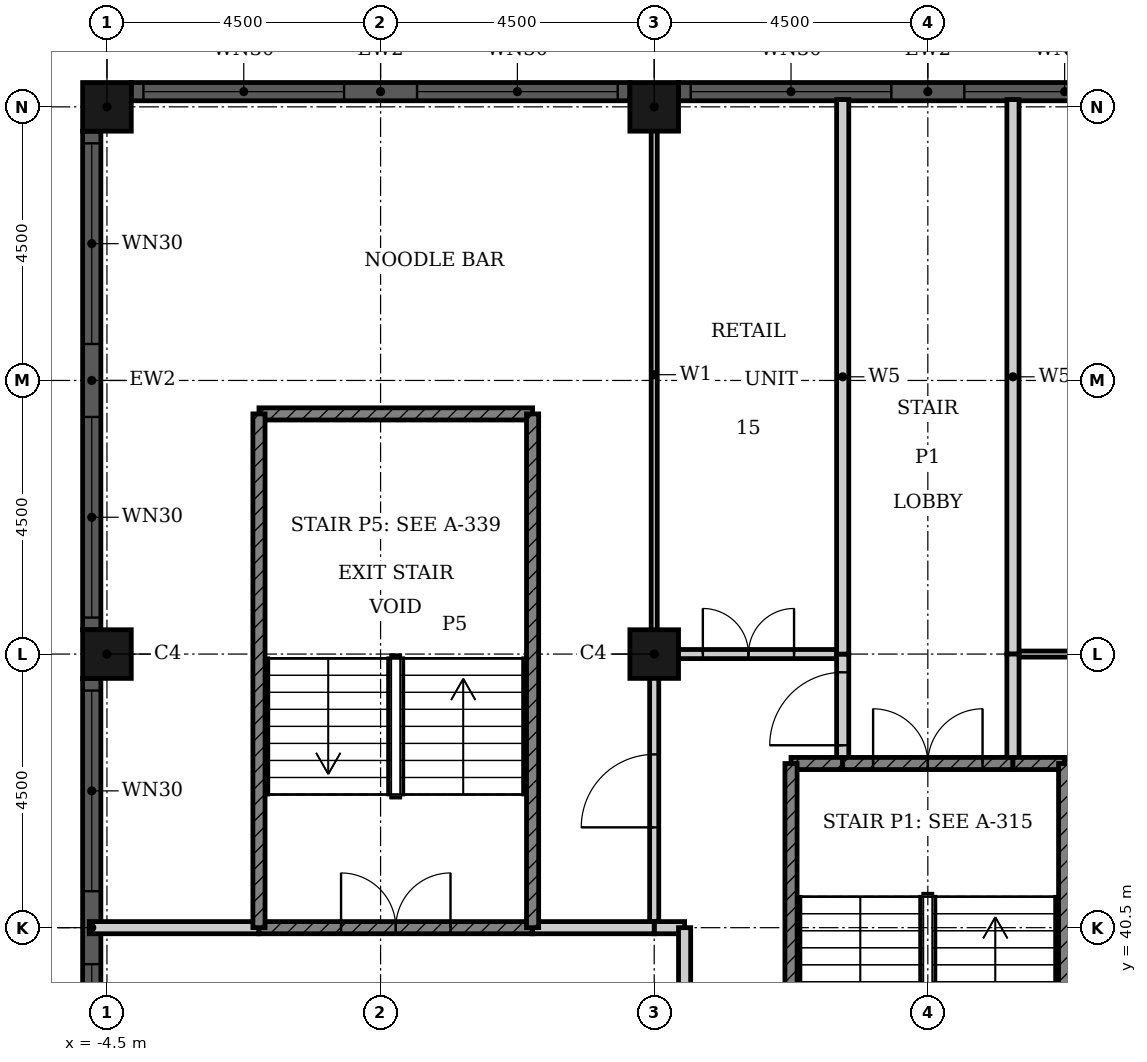
"""IFC4 building model, lengths in metres.
Left out: names, types, materials, properties, quantities, classifications, styles, units other than length and angle.
Written with IfcOpenShell. Run it as: python <this file> out.ifc"""

import sys

from ifc_helpers import new_model, si_unit, direction, frame, frame_2d, origin, origin_2d, place, context, subcontext, project, spatial, rectangle, hollow_rectangle, extrude, element, fill, save


model = new_model("IFC4")
c1 = context("Model", 3, precision=1e-05, world=origin(), true_north=direction((0.0, 1.0)))
c2 = subcontext(c1, "Body", "Model", "MODEL_VIEW")
j1 = project(units=[si_unit("LENGTHUNIT", "METRE"), si_unit("PLANEANGLEUNIT", "RADIAN")], contexts=[c1])
p1 = place(None, origin())
s1 = spatial("IfcSite", under=j1, at=p1, CompositionType="ELEMENT")
p2 = place(p1, origin())
s2 = spatial("IfcBuilding", under=s1, at=p2, CompositionType="ELEMENT")
p3 = place(p2, frame((0.0, 0.0, 12.0)))
s3 = spatial("IfcBuildingStorey", under=s2, at=p3, CompositionType="ELEMENT", Elevation=12.0)
for number, where, z_axis, x_axis in (
    (1, (-4.5, 45.0, 0.0), (0.0, 0.0, 1.0), (1.0, 0.0, 0.0)),
    (2, (-4.5, 54.0, 0.0), (0.0, 0.0, 1.0), (1.0, 0.0, 0.0)),
    (3, (4.5, 54.0, 0.0), (0.0, 0.0, 1.0), (1.0, 0.0, 0.0)),
    (4, (4.5, 45.0, 0.0), (0.0, 0.0, 1.0), (1.0, 0.0, 0.0)),
):
    element("IfcColumn", number, at=place(p3, frame(where, z_axis=z_axis, x_axis=x_axis)), inside=s3, PredefinedType="COLUMN", context=c2, shape_type="SweptSolid", body=[
        extrude(hollow_rectangle(XDim=0.8, YDim=0.8, WallThickness=0.025, at=origin_2d()), origin(), (0.0, 0.0, 1.0), 5.4),
    ])
p4 = place(p3, frame((13.1, 54.25, 0.0), z_axis=(0.0, 0.0, 1.0), x_axis=(-1.0, 0.0, 0.0)))
e5 = element("IfcWall", 5, at=p4, inside=s3, PredefinedType="SOLIDWALL", context=c2, shape_type="SweptSolid", body=[
    extrude(rectangle(XDim=8.2, YDim=0.3, at=frame_2d((4.1, 0.0))), origin(), (0.0, 0.0, 1.0), 5.4),
])
p5 = place(p4, frame((0.2, 0.0, 0.9)))
e6 = element("IfcOpeningElement", 6, at=p5, cuts=e5, PredefinedType="OPENING", context=c2, shape_type="SweptSolid", body=[
    extrude(rectangle(XDim=3.3, YDim=3.5, at=frame_2d((1.65, 1.75))), frame((0.0, 0.16, 0.0), z_axis=(0.0, -1.0, 0.0), x_axis=(1.0, 0.0, 0.0)), (0.0, 0.0, 1.0), 0.32),
])
p6 = place(p4, frame((4.7, 0.0, 0.9)))
e7 = element("IfcOpeningElement", 7, at=p6, cuts=e5, PredefinedType="OPENING", context=c2, shape_type="SweptSolid", body=[
    extrude(rectangle(XDim=3.3, YDim=3.5, at=frame_2d((1.65, 1.75))), frame((0.0, 0.16, 0.0), z_axis=(0.0, -1.0, 0.0), x_axis=(1.0, 0.0, 0.0)), (0.0, 0.0, 1.0), 0.32),
])
p7 = place(p3, frame((4.1, 54.25, 0.0), z_axis=(0.0, 0.0, 1.0), x_axis=(-1.0, 0.0, 0.0)))
e8 = element("IfcWall", 8, at=p7, inside=s3, PredefinedType="SOLIDWALL", context=c2, shape_type="SweptSolid", body=[
    extrude(rectangle(XDim=8.2, YDim=0.3, at=frame_2d((4.1, 0.0))), origin(), (0.0, 0.0, 1.0), 5.4),
])
p8 = place(p7, frame((0.2, 0.0, 0.9)))
e9 = element("IfcOpeningElement", 9, at=p8, cuts=e8, PredefinedType="OPENING", context=c2, shape_type="SweptSolid", body=[
    extrude(rectangle(XDim=3.3, YDim=3.5, at=frame_2d((1.65, 1.75))), frame((0.0, 0.16, 0.0), z_axis=(0.0, -1.0, 0.0), x_axis=(1.0, 0.0, 0.0)), (0.0, 0.0, 1.0), 0.32),
])
p9 = place(p7, frame((4.7, 0.0, 0.9)))
e10 = element("IfcOpeningElement", 10, at=p9, cuts=e8, PredefinedType="OPENING", context=c2, shape_type="SweptSolid", body=[
    extrude(rectangle(XDim=3.3, YDim=3.5, at=frame_2d((1.65, 1.75))), frame((0.0, 0.16, 0.0), z_axis=(0.0, -1.0, 0.0), x_axis=(1.0, 0.0, 0.0)), (0.0, 0.0, 1.0), 0.32),
])
p10 = place(p3, frame((-4.75, 53.6, 0.0), z_axis=(0.0, 0.0, 1.0), x_axis=(0.0, -1.0, 0.0)))
e11 = element("IfcWall", 11, at=p10, inside=s3, PredefinedType="SOLIDWALL", context=c2, shape_type="SweptSolid", body=[
    extrude(rectangle(XDim=8.2, YDim=0.3, at=frame_2d((4.1, 0.0))), origin(), (0.0, 0.0, 1.0), 5.4),
])
p11 = place(p10, frame((0.2, 0.0, 0.9)))
e12 = element("IfcOpeningElement", 12, at=p11, cuts=e11, PredefinedType="OPENING", context=c2, shape_type="SweptSolid", body=[
    extrude(rectangle(XDim=3.3, YDim=3.5, at=frame_2d((1.65, 1.75))), frame((0.0, 0.16, 0.0), z_axis=(0.0, -1.0, 0.0), x_axis=(1.0, 0.0, 0.0)), (0.0, 0.0, 1.0), 0.32),
])
p12 = place(p10, frame((4.7, 0.0, 0.9)))
e13 = element("IfcOpeningElement", 13, at=p12, cuts=e11, PredefinedType="OPENING", context=c2, shape_type="SweptSolid", body=[
    extrude(rectangle(XDim=3.3, YDim=3.5, at=frame_2d((1.65, 1.75))), frame((0.0, 0.16, 0.0), z_axis=(0.0, -1.0, 0.0), x_axis=(1.0, 0.0, 0.0)), (0.0, 0.0, 1.0), 0.32),
])
p13 = place(p3, frame((-4.75, 44.6, 0.0), z_axis=(0.0, 0.0, 1.0), x_axis=(0.0, -1.0, 0.0)))
e14 = element("IfcWall", 14, at=p13, inside=s3, PredefinedType="SOLIDWALL", context=c2, shape_type="SweptSolid", body=[
    extrude(rectangle(XDim=8.2, YDim=0.3, at=frame_2d((4.1, 0.0))), origin(), (0.0, 0.0, 1.0), 5.4),
])
p14 = place(p13, frame((0.2, 0.0, 0.9)))
e15 = element("IfcOpeningElement", 15, at=p14, cuts=e14, PredefinedType="OPENING", context=c2, shape_type="SweptSolid", body=[
    extrude(rectangle(XDim=3.3, YDim=3.5, at=frame_2d((1.65, 1.75))), frame((0.0, 0.16, 0.0), z_axis=(0.0, -1.0, 0.0), x_axis=(1.0, 0.0, 0.0)), (0.0, 0.0, 1.0), 0.32),
])
p15 = place(p13, frame((4.7, 0.0, 0.9)))
e16 = element("IfcOpeningElement", 16, at=p15, cuts=e14, PredefinedType="OPENING", context=c2, shape_type="SweptSolid", body=[
    extrude(rectangle(XDim=3.3, YDim=3.5, at=frame_2d((1.65, 1.75))), frame((0.0, 0.16, 0.0), z_axis=(0.0, -1.0, 0.0), x_axis=(1.0, 0.0, 0.0)), (0.0, 0.0, 1.0), 0.32),
])
p16 = place(p3, frame((4.5, 45.0, 0.0), z_axis=(0.0, 0.0, 1.0), x_axis=(1.0, 0.0, 0.0)))
e17 = element("IfcWall", 17, at=p16, inside=s3, PredefinedType="PARTITIONING", context=c2, shape_type="SweptSolid", body=[
    extrude(rectangle(XDim=3.1, YDim=0.15, at=frame_2d((1.55, 0.0))), origin(), (0.0, 0.0, 1.0), 5.05),
])
p17 = place(p16, frame((0.8, 0.0, 0.0)))
e18 = element("IfcOpeningElement", 18, at=p17, cuts=e17, PredefinedType="OPENING", context=c2, shape_type="SweptSolid", body=[
    extrude(rectangle(XDim=1.5, YDim=2.4, at=frame_2d((0.75, 1.2))), frame((0.0, 0.085, 0.0), z_axis=(0.0, -1.0, 0.0), x_axis=(1.0, 0.0, 0.0)), (0.0, 0.0, 1.0), 0.17),
])
p18 = place(p3, frame((4.5, 40.5, 0.0), z_axis=(0.0, 0.0, 1.0), x_axis=(0.0, 1.0, 0.0)))
e19 = element("IfcWall", 19, at=p18, inside=s3, PredefinedType="PARTITIONING", context=c2, shape_type="SweptSolid", body=[
    extrude(rectangle(XDim=4.5, YDim=0.15, at=frame_2d((2.25, 0.0))), origin(), (0.0, 0.0, 1.0), 5.05),
])
p19 = place(p18, frame((1.65, 0.0, 0.0)))
e20 = element("IfcOpeningElement", 20, at=p19, cuts=e19, PredefinedType="OPENING", context=c2, shape_type="SweptSolid", body=[
    extrude(rectangle(XDim=1.2, YDim=2.4, at=frame_2d((0.6, 1.2))), frame((0.0, 0.085, 0.0), z_axis=(0.0, -1.0, 0.0), x_axis=(1.0, 0.0, 0.0)), (0.0, 0.0, 1.0), 0.17),
])
p20 = place(p3, frame((10.4, 45.0, 0.0), z_axis=(0.0, 0.0, 1.0), x_axis=(1.0, 0.0, 0.0)))
e21 = element("IfcWall", 21, at=p20, inside=s3, PredefinedType="PARTITIONING", context=c2, shape_type="SweptSolid", body=[
    extrude(rectangle(XDim=4.6, YDim=0.1, at=frame_2d((2.3, 0.0))), origin(), (0.0, 0.0, 1.0), 5.05),
])
p21 = place(p3, frame((4.5, 45.0, 0.0), z_axis=(0.0, 0.0, 1.0), x_axis=(0.0, 1.0, 0.0)))
e22 = element("IfcWall", 22, at=p21, inside=s3, PredefinedType="PARTITIONING", context=c2, shape_type="SweptSolid", body=[
    extrude(rectangle(XDim=9.19, YDim=0.1, at=frame_2d((4.595, 0.0))), origin(), (0.0, 0.0, 1.0), 5.05),
])
p22 = place(p3, frame((4.5, 40.5, 0.0), z_axis=(0.0, 0.0, 1.0), x_axis=(1.0, 0.0, 0.0)))
e23 = element("IfcWall", 23, at=p22, inside=s3, PredefinedType="PARTITIONING", context=c2, shape_type="SweptSolid", body=[
    extrude(rectangle(XDim=0.5, YDim=0.2, at=frame_2d((0.25, 0.0))), origin(), (0.0, 0.0, 1.0), 5.05),
])
p23 = place(p3, frame((-4.79, 40.5, 0.0), z_axis=(0.0, 0.0, 1.0), x_axis=(1.0, 0.0, 0.0)))
e24 = element("IfcWall", 24, at=p23, inside=s3, PredefinedType="PARTITIONING", context=c2, shape_type="SweptSolid", body=[
    extrude(rectangle(XDim=2.79, YDim=0.2, at=frame_2d((1.395, 0.0))), origin(), (0.0, 0.0, 1.0), 5.05),
])
p24 = place(p3, frame((2.5, 40.5, 0.0), z_axis=(0.0, 0.0, 1.0), x_axis=(1.0, 0.0, 0.0)))
e25 = element("IfcWall", 25, at=p24, inside=s3, PredefinedType="PARTITIONING", context=c2, shape_type="SweptSolid", body=[
    extrude(rectangle(XDim=2.0, YDim=0.2, at=frame_2d((1.0, 0.0))), origin(), (0.0, 0.0, 1.0), 5.05),
])
p25 = place(p3, frame((10.4, 45.0, 0.0), z_axis=(0.0, 0.0, 1.0), x_axis=(0.0, 1.0, 0.0)))
e26 = element("IfcWall", 26, at=p25, inside=s3, PredefinedType="PARTITIONING", context=c2, shape_type="SweptSolid", body=[
    extrude(rectangle(XDim=9.12, YDim=0.2, at=frame_2d((4.56, 0.0))), origin(), (0.0, 0.0, 1.0), 5.05),
])
p26 = place(p3, frame((10.4, 43.2, 0.0), z_axis=(0.0, 0.0, 1.0), x_axis=(0.0, 1.0, 0.0)))
e27 = element("IfcWall", 27, at=p26, inside=s3, PredefinedType="PARTITIONING", context=c2, shape_type="SweptSolid", body=[
    extrude(rectangle(XDim=1.8, YDim=0.2, at=frame_2d((0.9, 0.0))), origin(), (0.0, 0.0, 1.0), 5.05),
])
p27 = place(p3, frame((5.0, 37.5, 0.0), z_axis=(0.0, 0.0, 1.0), x_axis=(0.0, 1.0, 0.0)))
e28 = element("IfcWall", 28, at=p27, inside=s3, PredefinedType="PARTITIONING", context=c2, shape_type="SweptSolid", body=[
    extrude(rectangle(XDim=3.0, YDim=0.2, at=frame_2d((1.5, 0.0))), origin(), (0.0, 0.0, 1.0), 5.05),
])
p28 = place(p3, frame((7.6, 43.2, 0.0), z_axis=(0.0, 0.0, 1.0), x_axis=(0.0, 1.0, 0.0)))
e29 = element("IfcWall", 29, at=p28, inside=s3, PredefinedType="PARTITIONING", context=c2, shape_type="SweptSolid", body=[
    extrude(rectangle(XDim=1.8, YDim=0.2, at=frame_2d((0.9, 0.0))), origin(), (0.0, 0.0, 1.0), 5.05),
])
p29 = place(p28, frame((0.3, 0.0, 0.0)))
e30 = element("IfcOpeningElement", 30, at=p29, cuts=e29, PredefinedType="OPENING", context=c2, shape_type="SweptSolid", body=[
    extrude(rectangle(XDim=1.2, YDim=2.1, at=frame_2d((0.6, 1.05))), frame((0.0, 0.11, 0.0), z_axis=(0.0, -1.0, 0.0), x_axis=(1.0, 0.0, 0.0)), (0.0, 0.0, 1.0), 0.22),
])
p30 = place(p3, frame((7.6, 45.0, 0.0), z_axis=(0.0, 0.0, 1.0), x_axis=(0.0, 1.0, 0.0)))
e31 = element("IfcWall", 31, at=p30, inside=s3, PredefinedType="PARTITIONING", context=c2, shape_type="SweptSolid", body=[
    extrude(rectangle(XDim=9.12, YDim=0.2, at=frame_2d((4.56, 0.0))), origin(), (0.0, 0.0, 1.0), 5.05),
])
p31 = place(p3, frame((-2.0, 40.5, 0.0), z_axis=(0.0, 0.0, 1.0), x_axis=(1.0, 0.0, 0.0)))
e32 = element("IfcWall", 32, at=p31, inside=s3, PredefinedType="SHEAR", context=c2, shape_type="SweptSolid", body=[
    extrude(rectangle(XDim=4.5, YDim=0.2, at=frame_2d((2.25, 0.0))), origin(), (0.0, 0.0, 1.0), 5.05),
])
p32 = place(p31, frame((1.35, 0.0, 0.0)))
e33 = element("IfcOpeningElement", 33, at=p32, cuts=e32, PredefinedType="OPENING", context=c2, shape_type="SweptSolid", body=[
    extrude(rectangle(XDim=1.8, YDim=2.1, at=frame_2d((0.9, 1.05))), frame((0.0, 0.11, 0.0), z_axis=(0.0, -1.0, 0.0), x_axis=(1.0, 0.0, 0.0)), (0.0, 0.0, 1.0), 0.22),
])
p33 = place(p3, frame((6.75, 43.2, 0.0), z_axis=(0.0, 0.0, 1.0), x_axis=(1.0, 0.0, 0.0)))
e34 = element("IfcWall", 34, at=p33, inside=s3, PredefinedType="SHEAR", context=c2, shape_type="SweptSolid", body=[
    extrude(rectangle(XDim=0.85, YDim=0.2, at=frame_2d((0.425, 0.0))), origin(), (0.0, 0.0, 1.0), 5.05),
])
p34 = place(p3, frame((7.6, 43.2, 0.0), z_axis=(0.0, 0.0, 1.0), x_axis=(1.0, 0.0, 0.0)))
e35 = element("IfcWall", 35, at=p34, inside=s3, PredefinedType="SHEAR", context=c2, shape_type="SweptSolid", body=[
    extrude(rectangle(XDim=2.8, YDim=0.2, at=frame_2d((1.4, 0.0))), origin(), (0.0, 0.0, 1.0), 5.05),
])
p35 = place(p34, frame((0.5, 0.0, 0.0)))
e36 = element("IfcOpeningElement", 36, at=p35, cuts=e35, PredefinedType="OPENING", context=c2, shape_type="SweptSolid", body=[
    extrude(rectangle(XDim=1.8, YDim=2.1, at=frame_2d((0.9, 1.05))), frame((0.0, 0.11, 0.0), z_axis=(0.0, -1.0, 0.0), x_axis=(1.0, 0.0, 0.0)), (0.0, 0.0, 1.0), 0.22),
])
p36 = place(p3, frame((10.4, 43.2, 0.0), z_axis=(0.0, 0.0, 1.0), x_axis=(1.0, 0.0, 0.0)))
e37 = element("IfcWall", 37, at=p36, inside=s3, PredefinedType="SHEAR", context=c2, shape_type="SweptSolid", body=[
    extrude(rectangle(XDim=0.85, YDim=0.2, at=frame_2d((0.425, 0.0))), origin(), (0.0, 0.0, 1.0), 5.05),
])
p37 = place(p3, frame((-2.0, 48.95, 0.0), z_axis=(0.0, 0.0, 1.0), x_axis=(1.0, 0.0, 0.0)))
e38 = element("IfcWall", 38, at=p37, inside=s3, PredefinedType="SHEAR", context=c2, shape_type="SweptSolid", body=[
    extrude(rectangle(XDim=4.5, YDim=0.2, at=frame_2d((2.25, 0.0))), origin(), (0.0, 0.0, 1.0), 5.05),
])
p38 = place(p3, frame((-2.0, 40.5, 0.0), z_axis=(0.0, 0.0, 1.0), x_axis=(0.0, 1.0, 0.0)))
e39 = element("IfcWall", 39, at=p38, inside=s3, PredefinedType="SHEAR", context=c2, shape_type="SweptSolid", body=[
    extrude(rectangle(XDim=8.45, YDim=0.2, at=frame_2d((4.225, 0.0))), origin(), (0.0, 0.0, 1.0), 5.05),
])
p39 = place(p3, frame((11.25, 36.0, 0.0), z_axis=(0.0, 0.0, 1.0), x_axis=(0.0, 1.0, 0.0)))
e40 = element("IfcWall", 40, at=p39, inside=s3, PredefinedType="SHEAR", context=c2, shape_type="SweptSolid", body=[
    extrude(rectangle(XDim=7.2, YDim=0.2, at=frame_2d((3.6, 0.0))), origin(), (0.0, 0.0, 1.0), 5.05),
])
for number, where, z_axis, x_axis in (
    (41, (2.5, 40.5, 0.0), (0.0, 0.0, 1.0), (0.0, 1.0, 0.0)),
    (42, (6.75, 34.75, 0.0), (0.0, 0.0, 1.0), (0.0, 1.0, 0.0)),
):
    element("IfcWall", number, at=place(p3, frame(where, z_axis=z_axis, x_axis=x_axis)), inside=s3, PredefinedType="SHEAR", context=c2, shape_type="SweptSolid", body=[
        extrude(rectangle(XDim=8.45, YDim=0.2, at=frame_2d((4.225, 0.0))), origin(), (0.0, 0.0, 1.0), 5.05),
    ])
p40 = place(p5, origin())
e43 = element("IfcWindow", 43, at=p40, inside=s3, PartitioningType="SINGLE_PANEL", PredefinedType="WINDOW", context=c2, shape_type="SweptSolid", body=[
    extrude(rectangle(XDim=3.3, YDim=3.5, at=frame_2d((1.65, 1.75))), frame((0.0, 0.03, 0.0), z_axis=(0.0, -1.0, 0.0), x_axis=(1.0, 0.0, 0.0)), (0.0, 0.0, 1.0), 0.06),
])
fill(e6, e43)
p41 = place(p6, origin())
e44 = element("IfcWindow", 44, at=p41, inside=s3, PartitioningType="SINGLE_PANEL", PredefinedType="WINDOW", context=c2, shape_type="SweptSolid", body=[
    extrude(rectangle(XDim=3.3, YDim=3.5, at=frame_2d((1.65, 1.75))), frame((0.0, 0.03, 0.0), z_axis=(0.0, -1.0, 0.0), x_axis=(1.0, 0.0, 0.0)), (0.0, 0.0, 1.0), 0.06),
])
fill(e7, e44)
p42 = place(p8, origin())
e45 = element("IfcWindow", 45, at=p42, inside=s3, PartitioningType="SINGLE_PANEL", PredefinedType="WINDOW", context=c2, shape_type="SweptSolid", body=[
    extrude(rectangle(XDim=3.3, YDim=3.5, at=frame_2d((1.65, 1.75))), frame((0.0, 0.03, 0.0), z_axis=(0.0, -1.0, 0.0), x_axis=(1.0, 0.0, 0.0)), (0.0, 0.0, 1.0), 0.06),
])
fill(e9, e45)
p43 = place(p9, origin())
e46 = element("IfcWindow", 46, at=p43, inside=s3, PartitioningType="SINGLE_PANEL", PredefinedType="WINDOW", context=c2, shape_type="SweptSolid", body=[
    extrude(rectangle(XDim=3.3, YDim=3.5, at=frame_2d((1.65, 1.75))), frame((0.0, 0.03, 0.0), z_axis=(0.0, -1.0, 0.0), x_axis=(1.0, 0.0, 0.0)), (0.0, 0.0, 1.0), 0.06),
])
fill(e10, e46)
p44 = place(p11, origin())
e47 = element("IfcWindow", 47, at=p44, inside=s3, PartitioningType="SINGLE_PANEL", PredefinedType="WINDOW", context=c2, shape_type="SweptSolid", body=[
    extrude(rectangle(XDim=3.3, YDim=3.5, at=frame_2d((1.65, 1.75))), frame((0.0, 0.03, 0.0), z_axis=(0.0, -1.0, 0.0), x_axis=(1.0, 0.0, 0.0)), (0.0, 0.0, 1.0), 0.06),
])
fill(e12, e47)
p45 = place(p12, origin())
e48 = element("IfcWindow", 48, at=p45, inside=s3, PartitioningType="SINGLE_PANEL", PredefinedType="WINDOW", context=c2, shape_type="SweptSolid", body=[
    extrude(rectangle(XDim=3.3, YDim=3.5, at=frame_2d((1.65, 1.75))), frame((0.0, 0.03, 0.0), z_axis=(0.0, -1.0, 0.0), x_axis=(1.0, 0.0, 0.0)), (0.0, 0.0, 1.0), 0.06),
])
fill(e13, e48)
p46 = place(p14, origin())
e49 = element("IfcWindow", 49, at=p46, inside=s3, PartitioningType="SINGLE_PANEL", PredefinedType="WINDOW", context=c2, shape_type="SweptSolid", body=[
    extrude(rectangle(XDim=3.3, YDim=3.5, at=frame_2d((1.65, 1.75))), frame((0.0, 0.03, 0.0), z_axis=(0.0, -1.0, 0.0), x_axis=(1.0, 0.0, 0.0)), (0.0, 0.0, 1.0), 0.06),
])
fill(e15, e49)
p47 = place(p15, origin())
e50 = element("IfcWindow", 50, at=p47, inside=s3, PartitioningType="SINGLE_PANEL", PredefinedType="WINDOW", context=c2, shape_type="SweptSolid", body=[
    extrude(rectangle(XDim=3.3, YDim=3.5, at=frame_2d((1.65, 1.75))), frame((0.0, 0.03, 0.0), z_axis=(0.0, -1.0, 0.0), x_axis=(1.0, 0.0, 0.0)), (0.0, 0.0, 1.0), 0.06),
])
fill(e16, e50)
p48 = place(p29, origin())
e51 = element("IfcDoor", 51, at=p48, inside=s3, OperationType="SINGLE_SWING_LEFT", PredefinedType="DOOR", context=c2, shape_type="SweptSolid", body=[
    extrude(rectangle(XDim=1.2, YDim=2.1, at=frame_2d((0.6, 1.05))), frame((0.0, 0.025, 0.0), z_axis=(0.0, -1.0, 0.0), x_axis=(1.0, 0.0, 0.0)), (0.0, 0.0, 1.0), 0.05),
])
fill(e30, e51)
p49 = place(p35, origin())
e52 = element("IfcDoor", 52, at=p49, inside=s3, OperationType="DOUBLE_DOOR_SINGLE_SWING", PredefinedType="DOOR", context=c2, shape_type="SweptSolid", body=[
    extrude(rectangle(XDim=1.8, YDim=2.1, at=frame_2d((0.9, 1.05))), frame((0.0, 0.025, 0.0), z_axis=(0.0, -1.0, 0.0), x_axis=(1.0, 0.0, 0.0)), (0.0, 0.0, 1.0), 0.05),
])
fill(e36, e52)
p50 = place(p32, origin())
e53 = element("IfcDoor", 53, at=p50, inside=s3, OperationType="DOUBLE_DOOR_SINGLE_SWING", PredefinedType="DOOR", context=c2, shape_type="SweptSolid", body=[
    extrude(rectangle(XDim=1.8, YDim=2.1, at=frame_2d((0.9, 1.05))), frame((0.0, 0.025, 0.0), z_axis=(0.0, -1.0, 0.0), x_axis=(1.0, 0.0, 0.0)), (0.0, 0.0, 1.0), 0.05),
])
fill(e33, e53)
p51 = place(p19, origin())
e54 = element("IfcDoor", 54, at=p51, inside=s3, OperationType="SINGLE_SWING_LEFT", PredefinedType="DOOR", context=c2, shape_type="SweptSolid", body=[
    extrude(rectangle(XDim=1.2, YDim=2.4, at=frame_2d((0.6, 1.2))), frame((0.0, 0.025, 0.0), z_axis=(0.0, -1.0, 0.0), x_axis=(1.0, 0.0, 0.0)), (0.0, 0.0, 1.0), 0.05),
])
fill(e20, e54)
p52 = place(p17, origin())
e55 = element("IfcDoor", 55, at=p52, inside=s3, OperationType="DOUBLE_DOOR_SINGLE_SWING", PredefinedType="DOOR", context=c2, shape_type="SweptSolid", body=[
    extrude(rectangle(XDim=1.5, YDim=2.4, at=frame_2d((0.75, 1.2))), frame((0.0, 0.025, 0.0), z_axis=(0.0, -1.0, 0.0), x_axis=(1.0, 0.0, 0.0)), (0.0, 0.0, 1.0), 0.05),
])
fill(e18, e55)
save(model, sys.argv[1])
